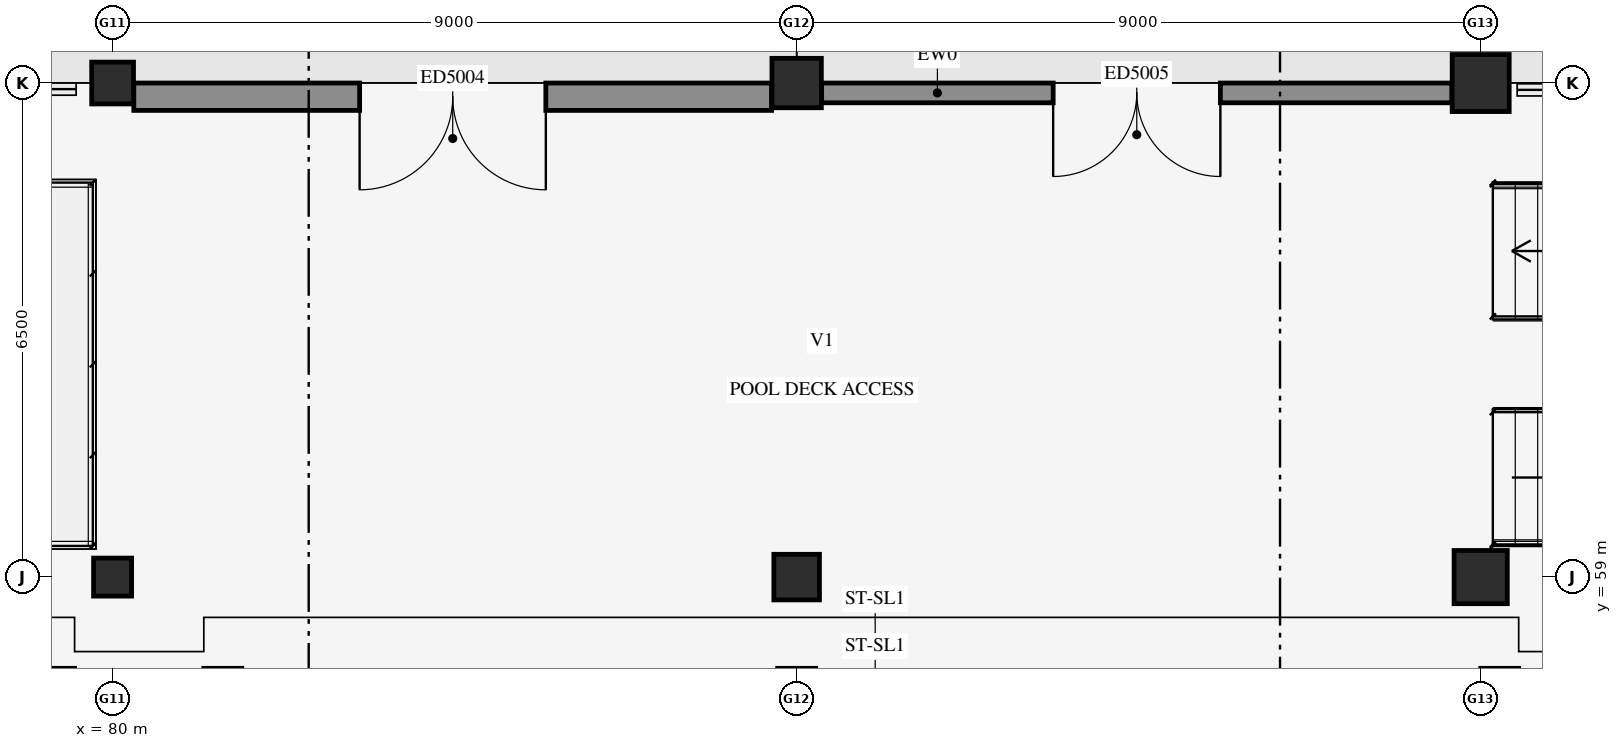
"""IFC4 building model, lengths in metres.
Left out: names, types, materials, properties, quantities, classifications, styles, units other than length and angle.
Written with IfcOpenShell. Run it as: python <this file> out.ifc"""

import sys

from ifc_helpers import new_model, si_unit, direction, frame, frame_2d, origin, origin_2d, place, context, subcontext, project, spatial, rectangle, extrude, element, fill, save


model = new_model("IFC4")
c1 = context("Model", 3, precision=1e-05, world=origin(), true_north=direction((0.0, 1.0)))
c2 = subcontext(c1, "Body", "Model", "MODEL_VIEW")
j1 = project(units=[si_unit("LENGTHUNIT", "METRE"), si_unit("PLANEANGLEUNIT", "RADIAN")], contexts=[c1])
p1 = place(None, origin())
s1 = spatial("IfcSite", under=j1, at=p1, CompositionType="ELEMENT")
p2 = place(p1, origin())
s2 = spatial("IfcBuilding", under=s1, at=p2, CompositionType="ELEMENT")
p3 = place(p2, origin())
s3 = spatial("IfcBuildingStorey", under=s2, at=p3, CompositionType="ELEMENT", Elevation=0.0)
p4 = place(p3, frame((80.0, 59.0, 0.0), z_axis=(0.0, 0.0, 1.0), x_axis=(1.0, 0.0, 0.0)))
e1 = element("IfcColumn", 1, at=p4, inside=s3, PredefinedType="COLUMN", context=c2, shape_type="SweptSolid", body=[
    extrude(rectangle(XDim=0.5, YDim=0.5, at=origin_2d()), origin(), (0.0, 0.0, 1.0), 5.4),
])
p5 = place(p3, frame((80.0, 65.5, 0.0), z_axis=(0.0, 0.0, 1.0), x_axis=(1.0, 0.0, 0.0)))
e2 = element("IfcColumn", 2, at=p5, inside=s3, PredefinedType="COLUMN", context=c2, shape_type="SweptSolid", body=[
    extrude(rectangle(XDim=0.55, YDim=0.55, at=origin_2d()), origin(), (0.0, 0.0, 1.0), 5.4),
])
p6 = place(p3, frame((89.0, 59.0, 0.0), z_axis=(0.0, 0.0, 1.0), x_axis=(1.0, 0.0, 0.0)))
e3 = element("IfcColumn", 3, at=p6, inside=s3, PredefinedType="COLUMN", context=c2, shape_type="SweptSolid", body=[
    extrude(rectangle(XDim=0.6, YDim=0.6, at=origin_2d()), origin(), (0.0, 0.0, 1.0), 5.4),
])
p7 = place(p3, frame((89.0, 65.5, 0.0), z_axis=(0.0, 0.0, 1.0), x_axis=(1.0, 0.0, 0.0)))
e4 = element("IfcColumn", 4, at=p7, inside=s3, PredefinedType="COLUMN", context=c2, shape_type="SweptSolid", body=[
    extrude(rectangle(XDim=0.65, YDim=0.65, at=origin_2d()), origin(), (0.0, 0.0, 1.0), 5.4),
])
p8 = place(p3, frame((98.0, 59.0, 0.0), z_axis=(0.0, 0.0, 1.0), x_axis=(1.0, 0.0, 0.0)))
e5 = element("IfcColumn", 5, at=p8, inside=s3, PredefinedType="COLUMN", context=c2, shape_type="SweptSolid", body=[
    extrude(rectangle(XDim=0.7, YDim=0.7, at=origin_2d()), origin(), (0.0, 0.0, 1.0), 5.4),
])
p9 = place(p3, frame((98.0, 65.5, 0.0), z_axis=(0.0, 0.0, 1.0), x_axis=(1.0, 0.0, 0.0)))
e6 = element("IfcColumn", 6, at=p9, inside=s3, PredefinedType="COLUMN", context=c2, shape_type="SweptSolid", body=[
    extrude(rectangle(XDim=0.75, YDim=0.75, at=origin_2d()), origin(), (0.0, 0.0, 1.0), 5.4),
])
p10 = place(p3, frame((80.279, 65.32, 0.0), z_axis=(0.0, 0.0, 1.0), x_axis=(1.0, 0.0, 0.0)))
e7 = element("IfcWall", 7, at=p10, inside=s3, PredefinedType="SOLIDWALL", context=c2, shape_type="SweptSolid", body=[
    extrude(rectangle(XDim=8.392, YDim=0.36, at=frame_2d((4.196, 0.0))), origin(), (0.0, 0.0, 1.0), 4.382),
])
p11 = place(p10, frame((2.971, 0.0, 0.0)))
e8 = element("IfcOpeningElement", 8, at=p11, cuts=e7, PredefinedType="OPENING", context=c2, shape_type="SweptSolid", body=[
    extrude(rectangle(XDim=2.45, YDim=2.95, at=frame_2d((1.225, 1.475))), frame((0.0, 0.192, 0.0), z_axis=(0.0, -1.0, 0.0), x_axis=(1.0, 0.0, 0.0)), (0.0, 0.0, 1.0), 0.384),
])
p12 = place(p3, frame((89.329, 65.37, 0.0), z_axis=(0.0, 0.0, 1.0), x_axis=(1.0, 0.0, 0.0)))
e9 = element("IfcWall", 9, at=p12, inside=s3, PredefinedType="SOLIDWALL", context=c2, shape_type="SweptSolid", body=[
    extrude(rectangle(XDim=8.292, YDim=0.26, at=frame_2d((4.146, 0.0))), origin(), (0.0, 0.0, 1.0), 4.29),
])
p13 = place(p12, frame((3.046, 0.0, 0.0)))
e10 = element("IfcOpeningElement", 10, at=p13, cuts=e9, PredefinedType="OPENING", context=c2, shape_type="SweptSolid", body=[
    extrude(rectangle(XDim=2.2, YDim=2.6, at=frame_2d((1.1, 1.3))), frame((0.0, 0.142, 0.0), z_axis=(0.0, -1.0, 0.0), x_axis=(1.0, 0.0, 0.0)), (0.0, 0.0, 1.0), 0.284),
])
p14 = place(p11, origin())
e11 = element("IfcDoor", 11, at=p14, inside=s3, OperationType="DOUBLE_DOOR_SINGLE_SWING", PredefinedType="DOOR", context=c2, shape_type="SweptSolid", body=[
    extrude(rectangle(XDim=2.45, YDim=2.95, at=frame_2d((1.225, 1.475))), frame((0.0, 0.025, 0.0), z_axis=(0.0, -1.0, 0.0), x_axis=(1.0, 0.0, 0.0)), (0.0, 0.0, 1.0), 0.05),
])
fill(e8, e11)
p15 = place(p13, origin())
e12 = element("IfcDoor", 12, at=p15, inside=s3, OperationType="DOUBLE_DOOR_SINGLE_SWING", PredefinedType="DOOR", context=c2, shape_type="SweptSolid", body=[
    extrude(rectangle(XDim=2.2, YDim=2.6, at=frame_2d((1.1, 1.3))), frame((0.0, 0.025, 0.0), z_axis=(0.0, -1.0, 0.0), x_axis=(1.0, 0.0, 0.0)), (0.0, 0.0, 1.0), 0.05),
])
fill(e10, e12)
save(model, sys.argv[1])
